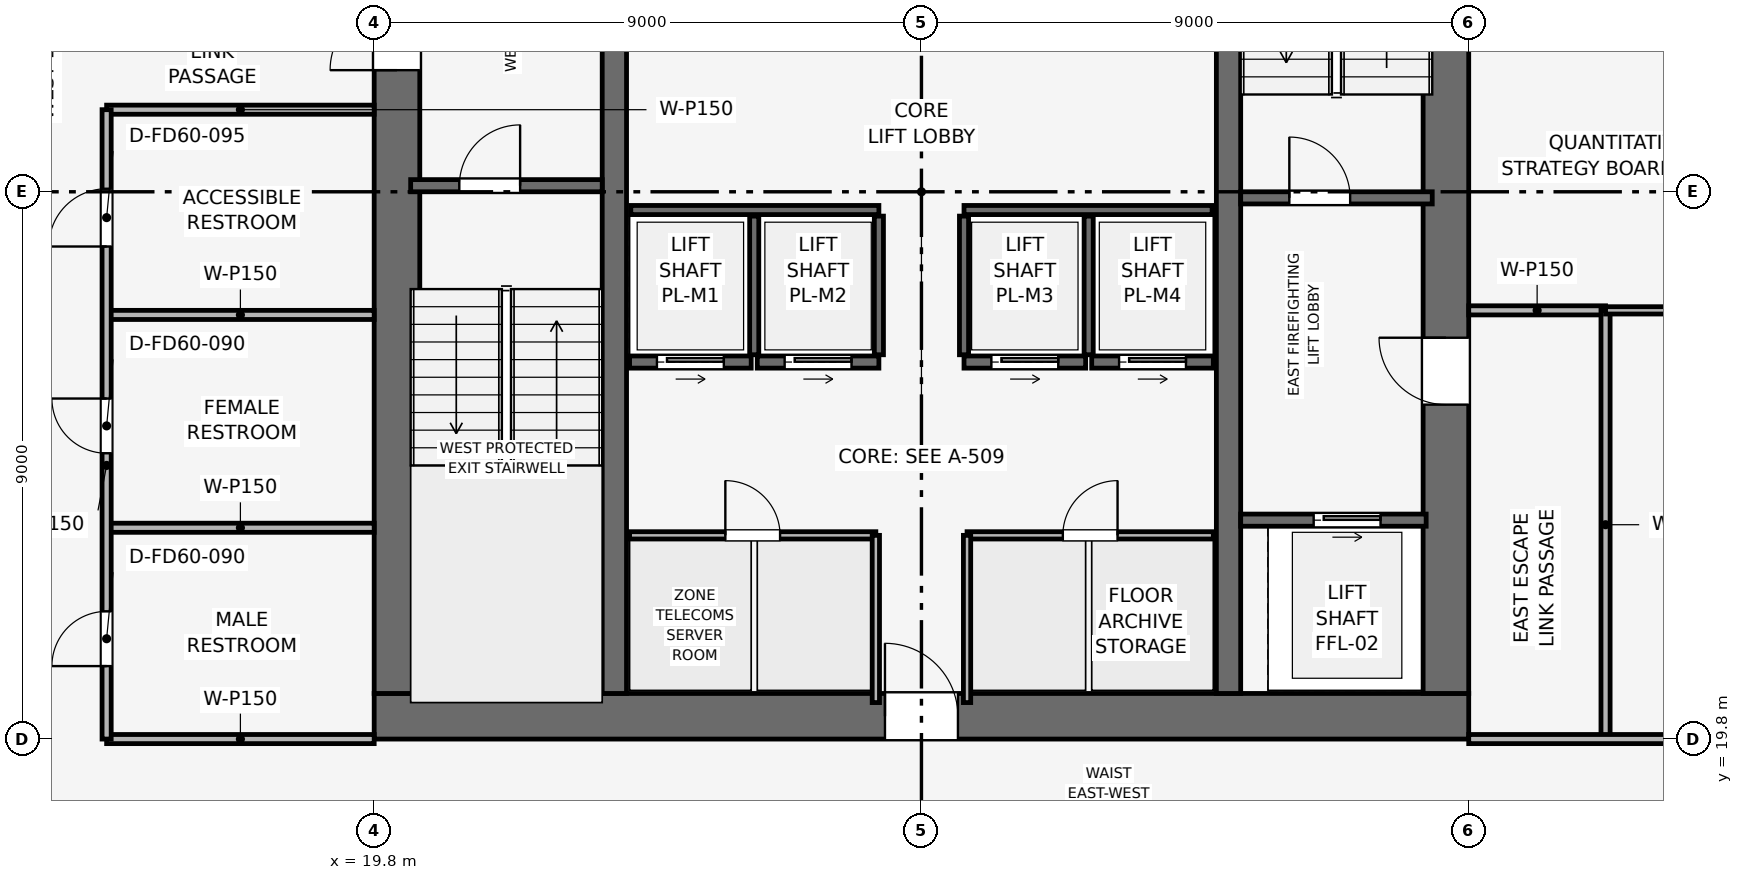
"""IFC4 building model, lengths in metres.
Left out: names, types, materials, properties, quantities, classifications, styles, units other than length and angle.
Written with IfcOpenShell. Run it as: python <this file> out.ifc"""

import sys

from ifc_helpers import new_model, si_unit, direction, frame, frame_2d, origin, place, context, subcontext, project, spatial, rectangle, extrude, element, fill, save


model = new_model("IFC4")
c1 = context("Model", 3, precision=1e-05, world=origin(), true_north=direction((0.0, 1.0)))
c2 = subcontext(c1, "Body", "Model", "MODEL_VIEW")
j1 = project(units=[si_unit("LENGTHUNIT", "METRE"), si_unit("PLANEANGLEUNIT", "RADIAN")], contexts=[c1])
p1 = place(None, origin())
s1 = spatial("IfcSite", under=j1, at=p1, CompositionType="ELEMENT")
p2 = place(p1, origin())
s2 = spatial("IfcBuilding", under=s1, at=p2, CompositionType="ELEMENT")
p3 = place(p2, frame((0.0, 0.0, 226.2)))
s3 = spatial("IfcBuildingStorey", under=s2, at=p3, CompositionType="ELEMENT", Elevation=226.2)
p4 = place(p3, frame((19.8, 20.175, 0.0), z_axis=(0.0, 0.0, 1.0), x_axis=(1.0, 0.0, 0.0)))
e1 = element("IfcWall", 1, at=p4, inside=s3, PredefinedType="SHEAR", context=c2, shape_type="SweptSolid", body=[
    extrude(rectangle(XDim=18.0, YDim=0.75, at=frame_2d((9.0, 0.0))), origin(), (0.0, 0.0, 1.0), 3.75),
])
p5 = place(p4, frame((8.4, 0.0, 0.0)))
e2 = element("IfcOpeningElement", 2, at=p5, cuts=e1, PredefinedType="OPENING", context=c2, shape_type="SweptSolid", body=[
    extrude(rectangle(XDim=1.2, YDim=2.2, at=frame_2d((0.6, 1.1))), frame((0.0, 0.385, 0.0), z_axis=(0.0, -1.0, 0.0), x_axis=(1.0, 0.0, 0.0)), (0.0, 0.0, 1.0), 0.77),
])
p6 = place(p3, frame((20.175, 20.55, 0.0), z_axis=(0.0, 0.0, 1.0), x_axis=(0.0, 1.0, 0.0)))
e3 = element("IfcWall", 3, at=p6, inside=s3, PredefinedType="SHEAR", context=c2, shape_type="SweptSolid", body=[
    extrude(rectangle(XDim=16.5, YDim=0.75, at=frame_2d((8.25, 0.0))), origin(), (0.0, 0.0, 1.0), 3.75),
])
p7 = place(p6, frame((10.25, 0.0, 0.0)))
e4 = element("IfcOpeningElement", 4, at=p7, cuts=e3, PredefinedType="OPENING", context=c2, shape_type="SweptSolid", body=[
    extrude(rectangle(XDim=1.1, YDim=2.15, at=frame_2d((0.55, 1.075))), frame((0.0, 0.385, 0.0), z_axis=(0.0, -1.0, 0.0), x_axis=(1.0, 0.0, 0.0)), (0.0, 0.0, 1.0), 0.77),
])
p8 = place(p3, frame((37.425, 20.55, 0.0), z_axis=(0.0, 0.0, 1.0), x_axis=(0.0, 1.0, 0.0)))
e5 = element("IfcWall", 5, at=p8, inside=s3, PredefinedType="SHEAR", context=c2, shape_type="SweptSolid", body=[
    extrude(rectangle(XDim=16.5, YDim=0.75, at=frame_2d((8.25, 0.0))), origin(), (0.0, 0.0, 1.0), 3.75),
])
p9 = place(p8, frame((4.75, 0.0, 0.0)))
e6 = element("IfcOpeningElement", 6, at=p9, cuts=e5, PredefinedType="OPENING", context=c2, shape_type="SweptSolid", body=[
    extrude(rectangle(XDim=1.1, YDim=2.15, at=frame_2d((0.55, 1.075))), frame((0.0, 0.385, 0.0), z_axis=(0.0, -1.0, 0.0), x_axis=(1.0, 0.0, 0.0)), (0.0, 0.0, 1.0), 0.77),
])
for number, where, z_axis, x_axis in (
    (7, (23.75, 20.55, 0.0), (0.0, 0.0, 1.0), (0.0, 1.0, 0.0)),
    (8, (33.85, 20.55, 0.0), (0.0, 0.0, 1.0), (0.0, 1.0, 0.0)),
):
    element("IfcWall", number, at=place(p3, frame(where, z_axis=z_axis, x_axis=x_axis)), inside=s3, PredefinedType="SHEAR", context=c2, shape_type="SweptSolid", body=[
        extrude(rectangle(XDim=16.5, YDim=0.4, at=frame_2d((8.25, 0.0))), origin(), (0.0, 0.0, 1.0), 3.75),
    ])
p10 = place(p3, frame((20.4, 28.9, 0.0), z_axis=(0.0, 0.0, 1.0), x_axis=(1.0, 0.0, 0.0)))
e9 = element("IfcWall", 9, at=p10, inside=s3, PredefinedType="SHEAR", context=c2, shape_type="SweptSolid", body=[
    extrude(rectangle(XDim=3.15, YDim=0.2, at=frame_2d((1.575, 0.0))), origin(), (0.0, 0.0, 1.0), 3.5),
])
p11 = place(p10, frame((0.8, 0.0, 0.0)))
e10 = element("IfcOpeningElement", 10, at=p11, cuts=e9, PredefinedType="OPENING", context=c2, shape_type="SweptSolid", body=[
    extrude(rectangle(XDim=1.0, YDim=2.1, at=frame_2d((0.5, 1.05))), frame((0.0, 0.11, 0.0), z_axis=(0.0, -1.0, 0.0), x_axis=(1.0, 0.0, 0.0)), (0.0, 0.0, 1.0), 0.22),
])
p12 = place(p3, frame((34.05, 28.7, 0.0), z_axis=(0.0, 0.0, 1.0), x_axis=(1.0, 0.0, 0.0)))
e11 = element("IfcWall", 11, at=p12, inside=s3, PredefinedType="SHEAR", context=c2, shape_type="SweptSolid", body=[
    extrude(rectangle(XDim=3.15, YDim=0.2, at=frame_2d((1.575, 0.0))), origin(), (0.0, 0.0, 1.0), 3.5),
])
p13 = place(p12, frame((0.8, 0.0, 0.0)))
e12 = element("IfcOpeningElement", 12, at=p13, cuts=e11, PredefinedType="OPENING", context=c2, shape_type="SweptSolid", body=[
    extrude(rectangle(XDim=1.0, YDim=2.1, at=frame_2d((0.5, 1.05))), frame((0.0, 0.11, 0.0), z_axis=(0.0, -1.0, 0.0), x_axis=(1.0, 0.0, 0.0)), (0.0, 0.0, 1.0), 0.22),
])
p14 = place(p3, frame((34.05, 23.4, 0.0), z_axis=(0.0, 0.0, 1.0), x_axis=(1.0, 0.0, 0.0)))
e13 = element("IfcWall", 13, at=p14, inside=s3, PredefinedType="SHEAR", context=c2, shape_type="SweptSolid", body=[
    extrude(rectangle(XDim=3.05, YDim=0.2, at=frame_2d((1.525, 0.0))), origin(), (0.0, 0.0, 1.0), 3.5),
])
p15 = place(p14, frame((1.2, 0.0, 0.0)))
e14 = element("IfcOpeningElement", 14, at=p15, cuts=e13, PredefinedType="OPENING", context=c2, shape_type="SweptSolid", body=[
    extrude(rectangle(XDim=1.1, YDim=2.15, at=frame_2d((0.55, 1.075))), frame((0.0, 0.11, 0.0), z_axis=(0.0, -1.0, 0.0), x_axis=(1.0, 0.0, 0.0)), (0.0, 0.0, 1.0), 0.22),
])
p16 = place(p3, frame((24.0, 26.0, 0.0), z_axis=(0.0, 0.0, 1.0), x_axis=(1.0, 0.0, 0.0)))
e15 = element("IfcWall", 15, at=p16, inside=s3, PredefinedType="SHEAR", context=c2, shape_type="SweptSolid", body=[
    extrude(rectangle(XDim=2.0, YDim=0.2, at=frame_2d((1.0, 0.0))), origin(), (0.0, 0.0, 1.0), 3.5),
])
p17 = place(p16, frame((0.45, 0.0, 0.0)))
e16 = element("IfcOpeningElement", 16, at=p17, cuts=e15, PredefinedType="OPENING", context=c2, shape_type="SweptSolid", body=[
    extrude(rectangle(XDim=1.1, YDim=2.15, at=frame_2d((0.55, 1.075))), frame((0.0, 0.11, 0.0), z_axis=(0.0, -1.0, 0.0), x_axis=(1.0, 0.0, 0.0)), (0.0, 0.0, 1.0), 0.22),
])
p18 = place(p3, frame((26.1, 26.0, 0.0), z_axis=(0.0, 0.0, 1.0), x_axis=(1.0, 0.0, 0.0)))
e17 = element("IfcWall", 17, at=p18, inside=s3, PredefinedType="SHEAR", context=c2, shape_type="SweptSolid", body=[
    extrude(rectangle(XDim=2.0, YDim=0.2, at=frame_2d((1.0, 0.0))), origin(), (0.0, 0.0, 1.0), 3.5),
])
p19 = place(p18, frame((0.45, 0.0, 0.0)))
e18 = element("IfcOpeningElement", 18, at=p19, cuts=e17, PredefinedType="OPENING", context=c2, shape_type="SweptSolid", body=[
    extrude(rectangle(XDim=1.1, YDim=2.15, at=frame_2d((0.55, 1.075))), frame((0.0, 0.11, 0.0), z_axis=(0.0, -1.0, 0.0), x_axis=(1.0, 0.0, 0.0)), (0.0, 0.0, 1.0), 0.22),
])
p20 = place(p3, frame((29.5, 26.0, 0.0), z_axis=(0.0, 0.0, 1.0), x_axis=(1.0, 0.0, 0.0)))
e19 = element("IfcWall", 19, at=p20, inside=s3, PredefinedType="SHEAR", context=c2, shape_type="SweptSolid", body=[
    extrude(rectangle(XDim=2.0, YDim=0.2, at=frame_2d((1.0, 0.0))), origin(), (0.0, 0.0, 1.0), 3.5),
])
p21 = place(p20, frame((0.45, 0.0, 0.0)))
e20 = element("IfcOpeningElement", 20, at=p21, cuts=e19, PredefinedType="OPENING", context=c2, shape_type="SweptSolid", body=[
    extrude(rectangle(XDim=1.1, YDim=2.15, at=frame_2d((0.55, 1.075))), frame((0.0, 0.11, 0.0), z_axis=(0.0, -1.0, 0.0), x_axis=(1.0, 0.0, 0.0)), (0.0, 0.0, 1.0), 0.22),
])
p22 = place(p3, frame((31.6, 26.0, 0.0), z_axis=(0.0, 0.0, 1.0), x_axis=(1.0, 0.0, 0.0)))
e21 = element("IfcWall", 21, at=p22, inside=s3, PredefinedType="SHEAR", context=c2, shape_type="SweptSolid", body=[
    extrude(rectangle(XDim=2.0, YDim=0.2, at=frame_2d((1.0, 0.0))), origin(), (0.0, 0.0, 1.0), 3.5),
])
p23 = place(p22, frame((0.45, 0.0, 0.0)))
e22 = element("IfcOpeningElement", 22, at=p23, cuts=e21, PredefinedType="OPENING", context=c2, shape_type="SweptSolid", body=[
    extrude(rectangle(XDim=1.1, YDim=2.15, at=frame_2d((0.55, 1.075))), frame((0.0, 0.11, 0.0), z_axis=(0.0, -1.0, 0.0), x_axis=(1.0, 0.0, 0.0)), (0.0, 0.0, 1.0), 0.22),
])
for number, where, z_axis, x_axis in (
    (23, (24.02, 28.5, 0.0), (0.0, 0.0, 1.0), (1.0, 0.0, 0.0)),
    (24, (29.5, 28.5, 0.0), (0.0, 0.0, 1.0), (1.0, 0.0, 0.0)),
):
    element("IfcWall", number, at=place(p3, frame(where, z_axis=z_axis, x_axis=x_axis)), inside=s3, PredefinedType="SHEAR", context=c2, shape_type="SweptSolid", body=[
        extrude(rectangle(XDim=4.08, YDim=0.15, at=frame_2d((2.04, 0.0))), origin(), (0.0, 0.0, 1.0), 3.5),
    ])
for number, where, z_axis, x_axis in (
    (25, (26.05, 26.12, 0.0), (0.0, 0.0, 1.0), (0.0, 1.0, 0.0)),
    (26, (28.1, 26.12, 0.0), (0.0, 0.0, 1.0), (0.0, 1.0, 0.0)),
    (27, (29.5, 26.12, 0.0), (0.0, 0.0, 1.0), (0.0, 1.0, 0.0)),
    (28, (31.55, 26.12, 0.0), (0.0, 0.0, 1.0), (0.0, 1.0, 0.0)),
):
    element("IfcWall", number, at=place(p3, frame(where, z_axis=z_axis, x_axis=x_axis)), inside=s3, PredefinedType="SHEAR", context=c2, shape_type="SweptSolid", body=[
        extrude(rectangle(XDim=2.28, YDim=0.15, at=frame_2d((1.14, 0.0))), origin(), (0.0, 0.0, 1.0), 3.5),
    ])
p24 = place(p3, frame((24.0, 23.15, 0.0), z_axis=(0.0, 0.0, 1.0), x_axis=(1.0, 0.0, 0.0)))
e29 = element("IfcWall", 29, at=p24, inside=s3, PredefinedType="PARTITIONING", context=c2, shape_type="SweptSolid", body=[
    extrude(rectangle(XDim=4.05, YDim=0.12, at=frame_2d((2.025, 0.0))), origin(), (0.0, 0.0, 1.0), 3.5),
])
p25 = place(p24, frame((1.575, 0.0, 0.0)))
e30 = element("IfcOpeningElement", 30, at=p25, cuts=e29, PredefinedType="OPENING", context=c2, shape_type="SweptSolid", body=[
    extrude(rectangle(XDim=0.9, YDim=2.1, at=frame_2d((0.45, 1.05))), frame((0.0, 0.07, 0.0), z_axis=(0.0, -1.0, 0.0), x_axis=(1.0, 0.0, 0.0)), (0.0, 0.0, 1.0), 0.14),
])
p26 = place(p3, frame((28.05, 20.4, 0.0), z_axis=(0.0, 0.0, 1.0), x_axis=(0.0, 1.0, 0.0)))
e31 = element("IfcWall", 31, at=p26, inside=s3, PredefinedType="PARTITIONING", context=c2, shape_type="SweptSolid", body=[
    extrude(rectangle(XDim=2.75, YDim=0.12, at=frame_2d((1.375, 0.0))), origin(), (0.0, 0.0, 1.0), 3.5),
])
p27 = place(p3, frame((29.55, 23.15, 0.0), z_axis=(0.0, 0.0, 1.0), x_axis=(1.0, 0.0, 0.0)))
e32 = element("IfcWall", 32, at=p27, inside=s3, PredefinedType="PARTITIONING", context=c2, shape_type="SweptSolid", body=[
    extrude(rectangle(XDim=4.05, YDim=0.12, at=frame_2d((2.025, 0.0))), origin(), (0.0, 0.0, 1.0), 3.5),
])
p28 = place(p27, frame((1.575, 0.0, 0.0)))
e33 = element("IfcOpeningElement", 33, at=p28, cuts=e32, PredefinedType="OPENING", context=c2, shape_type="SweptSolid", body=[
    extrude(rectangle(XDim=0.9, YDim=2.1, at=frame_2d((0.45, 1.05))), frame((0.0, 0.07, 0.0), z_axis=(0.0, -1.0, 0.0), x_axis=(1.0, 0.0, 0.0)), (0.0, 0.0, 1.0), 0.14),
])
p29 = place(p3, frame((29.55, 20.4, 0.0), z_axis=(0.0, 0.0, 1.0), x_axis=(0.0, 1.0, 0.0)))
e34 = element("IfcWall", 34, at=p29, inside=s3, PredefinedType="PARTITIONING", context=c2, shape_type="SweptSolid", body=[
    extrude(rectangle(XDim=2.75, YDim=0.12, at=frame_2d((1.375, 0.0))), origin(), (0.0, 0.0, 1.0), 3.5),
])
p30 = place(p3, frame((15.4, 19.8, 0.0), z_axis=(0.0, 0.0, 1.0), x_axis=(1.0, 0.0, 0.0)))
e35 = element("IfcWall", 35, at=p30, inside=s3, PredefinedType="PARTITIONING", context=c2, shape_type="SweptSolid", body=[
    extrude(rectangle(XDim=4.4, YDim=0.15, at=frame_2d((2.2, 0.0))), origin(), (0.0, 0.0, 1.0), 3.035),
])
for number, where, z_axis, x_axis in (
    (36, (15.4, 23.275, 0.0), (0.0, 0.0, 1.0), (1.0, 0.0, 0.0)),
    (37, (15.4, 26.775, 0.0), (0.0, 0.0, 1.0), (1.0, 0.0, 0.0)),
    (38, (15.4, 30.15, 0.0), (0.0, 0.0, 1.0), (1.0, 0.0, 0.0)),
):
    element("IfcWall", number, at=place(p3, frame(where, z_axis=z_axis, x_axis=x_axis)), inside=s3, PredefinedType="PARTITIONING", context=c2, shape_type="SweptSolid", body=[
        extrude(rectangle(XDim=4.4, YDim=0.15, at=frame_2d((2.2, 0.0))), origin(), (0.0, 0.0, 1.0), 3.5),
    ])
p31 = place(p3, frame((15.4, 19.8, 0.0), z_axis=(0.0, 0.0, 1.0), x_axis=(0.0, 1.0, 0.0)))
e39 = element("IfcWall", 39, at=p31, inside=s3, PredefinedType="PARTITIONING", context=c2, shape_type="SweptSolid", body=[
    extrude(rectangle(XDim=10.35, YDim=0.15, at=frame_2d((5.175, 0.0))), origin(), (0.0, 0.0, 1.0), 3.035),
])
p32 = place(p31, frame((1.2, 0.0, 0.0)))
e40 = element("IfcOpeningElement", 40, at=p32, cuts=e39, PredefinedType="OPENING", context=c2, shape_type="SweptSolid", body=[
    extrude(rectangle(XDim=0.9, YDim=2.1, at=frame_2d((0.45, 1.05))), frame((0.0, 0.085, 0.0), z_axis=(0.0, -1.0, 0.0), x_axis=(1.0, 0.0, 0.0)), (0.0, 0.0, 1.0), 0.17),
])
p33 = place(p31, frame((4.7, 0.0, 0.0)))
e41 = element("IfcOpeningElement", 41, at=p33, cuts=e39, PredefinedType="OPENING", context=c2, shape_type="SweptSolid", body=[
    extrude(rectangle(XDim=0.9, YDim=2.1, at=frame_2d((0.45, 1.05))), frame((0.0, 0.085, 0.0), z_axis=(0.0, -1.0, 0.0), x_axis=(1.0, 0.0, 0.0)), (0.0, 0.0, 1.0), 0.17),
])
p34 = place(p31, frame((8.1, 0.0, 0.0)))
e42 = element("IfcOpeningElement", 42, at=p34, cuts=e39, PredefinedType="OPENING", context=c2, shape_type="SweptSolid", body=[
    extrude(rectangle(XDim=0.95, YDim=2.1, at=frame_2d((0.475, 1.05))), frame((0.0, 0.085, 0.0), z_axis=(0.0, -1.0, 0.0), x_axis=(1.0, 0.0, 0.0)), (0.0, 0.0, 1.0), 0.17),
])
p35 = place(p3, frame((37.8, 26.85, 0.0), z_axis=(0.0, 0.0, 1.0), x_axis=(1.0, 0.0, 0.0)))
e43 = element("IfcWall", 43, at=p35, inside=s3, PredefinedType="PARTITIONING", context=c2, shape_type="SweptSolid", body=[
    extrude(rectangle(XDim=2.25, YDim=0.15, at=frame_2d((1.125, 0.0))), origin(), (0.0, 0.0, 1.0), 3.5),
])
p36 = place(p3, frame((40.05, 19.8, 0.0), z_axis=(0.0, 0.0, 1.0), x_axis=(0.0, 1.0, 0.0)))
e44 = element("IfcWall", 44, at=p36, inside=s3, PredefinedType="PARTITIONING", context=c2, shape_type="SweptSolid", body=[
    extrude(rectangle(XDim=7.05, YDim=0.15, at=frame_2d((3.525, 0.0))), origin(), (0.0, 0.0, 1.0), 3.035),
])
p37 = place(p3, frame((40.05, 26.85, 0.0), z_axis=(0.0, 0.0, 1.0), x_axis=(1.0, 0.0, 0.0)))
e45 = element("IfcWall", 45, at=p37, inside=s3, PredefinedType="PARTITIONING", context=c2, shape_type="SweptSolid", body=[
    extrude(rectangle(XDim=15.62, YDim=0.12, at=frame_2d((7.81, 0.0))), origin(), (0.0, 0.0, 1.0), 2.885),
])
p38 = place(p3, frame((37.8, 19.8, 0.0), z_axis=(0.0, 0.0, 1.0), x_axis=(1.0, 0.0, 0.0)))
e46 = element("IfcWall", 46, at=p38, inside=s3, PredefinedType="PARTITIONING", context=c2, shape_type="SweptSolid", body=[
    extrude(rectangle(XDim=17.87, YDim=0.15, at=frame_2d((8.935, 0.0))), origin(), (0.0, 0.0, 1.0), 2.885),
])
p39 = place(p38, frame((4.4, 0.0, 0.0)))
e47 = element("IfcOpeningElement", 47, at=p39, cuts=e46, PredefinedType="OPENING", context=c2, shape_type="SweptSolid", body=[
    extrude(rectangle(XDim=0.9, YDim=2.1, at=frame_2d((0.45, 1.05))), frame((0.0, 0.085, 0.0), z_axis=(0.0, -1.0, 0.0), x_axis=(1.0, 0.0, 0.0)), (0.0, 0.0, 1.0), 0.17),
])
p40 = place(p11, origin())
e48 = element("IfcDoor", 48, at=p40, inside=s3, OperationType="SINGLE_SWING_RIGHT", PredefinedType="DOOR", context=c2, shape_type="SweptSolid", body=[
    extrude(rectangle(XDim=1.0, YDim=2.1, at=frame_2d((0.5, 1.05))), frame((0.0, 0.025, 0.0), z_axis=(0.0, -1.0, 0.0), x_axis=(1.0, 0.0, 0.0)), (0.0, 0.0, 1.0), 0.05),
])
fill(e10, e48)
p41 = place(p13, origin())
e49 = element("IfcDoor", 49, at=p41, inside=s3, OperationType="SINGLE_SWING_LEFT", PredefinedType="DOOR", context=c2, shape_type="SweptSolid", body=[
    extrude(rectangle(XDim=1.0, YDim=2.1, at=frame_2d((0.5, 1.05))), frame((0.0, 0.025, 0.0), z_axis=(0.0, -1.0, 0.0), x_axis=(1.0, 0.0, 0.0)), (0.0, 0.0, 1.0), 0.05),
])
fill(e12, e49)
p42 = place(p15, origin())
e50 = element("IfcDoor", 50, at=p42, inside=s3, OperationType="SLIDING_TO_RIGHT", PredefinedType="DOOR", context=c2, shape_type="SweptSolid", body=[
    extrude(rectangle(XDim=1.1, YDim=2.15, at=frame_2d((0.55, 1.075))), frame((0.0, 0.025, 0.0), z_axis=(0.0, -1.0, 0.0), x_axis=(1.0, 0.0, 0.0)), (0.0, 0.0, 1.0), 0.05),
])
fill(e14, e50)
p43 = place(p17, origin())
e51 = element("IfcDoor", 51, at=p43, inside=s3, OperationType="SLIDING_TO_RIGHT", PredefinedType="DOOR", context=c2, shape_type="SweptSolid", body=[
    extrude(rectangle(XDim=1.1, YDim=2.15, at=frame_2d((0.55, 1.075))), frame((0.0, 0.025, 0.0), z_axis=(0.0, -1.0, 0.0), x_axis=(1.0, 0.0, 0.0)), (0.0, 0.0, 1.0), 0.05),
])
fill(e16, e51)
p44 = place(p19, origin())
e52 = element("IfcDoor", 52, at=p44, inside=s3, OperationType="SLIDING_TO_RIGHT", PredefinedType="DOOR", context=c2, shape_type="SweptSolid", body=[
    extrude(rectangle(XDim=1.1, YDim=2.15, at=frame_2d((0.55, 1.075))), frame((0.0, 0.025, 0.0), z_axis=(0.0, -1.0, 0.0), x_axis=(1.0, 0.0, 0.0)), (0.0, 0.0, 1.0), 0.05),
])
fill(e18, e52)
p45 = place(p21, origin())
e53 = element("IfcDoor", 53, at=p45, inside=s3, OperationType="SLIDING_TO_RIGHT", PredefinedType="DOOR", context=c2, shape_type="SweptSolid", body=[
    extrude(rectangle(XDim=1.1, YDim=2.15, at=frame_2d((0.55, 1.075))), frame((0.0, 0.025, 0.0), z_axis=(0.0, -1.0, 0.0), x_axis=(1.0, 0.0, 0.0)), (0.0, 0.0, 1.0), 0.05),
])
fill(e20, e53)
p46 = place(p23, origin())
e54 = element("IfcDoor", 54, at=p46, inside=s3, OperationType="SLIDING_TO_RIGHT", PredefinedType="DOOR", context=c2, shape_type="SweptSolid", body=[
    extrude(rectangle(XDim=1.1, YDim=2.15, at=frame_2d((0.55, 1.075))), frame((0.0, 0.025, 0.0), z_axis=(0.0, -1.0, 0.0), x_axis=(1.0, 0.0, 0.0)), (0.0, 0.0, 1.0), 0.05),
])
fill(e22, e54)
p47 = place(p25, origin())
e55 = element("IfcDoor", 55, at=p47, inside=s3, OperationType="SINGLE_SWING_LEFT", PredefinedType="DOOR", context=c2, shape_type="SweptSolid", body=[
    extrude(rectangle(XDim=0.9, YDim=2.1, at=frame_2d((0.45, 1.05))), frame((0.0, 0.025, 0.0), z_axis=(0.0, -1.0, 0.0), x_axis=(1.0, 0.0, 0.0)), (0.0, 0.0, 1.0), 0.05),
])
fill(e30, e55)
p48 = place(p28, origin())
e56 = element("IfcDoor", 56, at=p48, inside=s3, OperationType="SINGLE_SWING_RIGHT", PredefinedType="DOOR", context=c2, shape_type="SweptSolid", body=[
    extrude(rectangle(XDim=0.9, YDim=2.1, at=frame_2d((0.45, 1.05))), frame((0.0, 0.025, 0.0), z_axis=(0.0, -1.0, 0.0), x_axis=(1.0, 0.0, 0.0)), (0.0, 0.0, 1.0), 0.05),
])
fill(e33, e56)
p49 = place(p32, origin())
e57 = element("IfcDoor", 57, at=p49, inside=s3, OperationType="SINGLE_SWING_LEFT", PredefinedType="DOOR", context=c2, shape_type="SweptSolid", body=[
    extrude(rectangle(XDim=0.9, YDim=2.1, at=frame_2d((0.45, 1.05))), frame((0.0, 0.025, 0.0), z_axis=(0.0, -1.0, 0.0), x_axis=(1.0, 0.0, 0.0)), (0.0, 0.0, 1.0), 0.05),
])
fill(e40, e57)
p50 = place(p33, origin())
e58 = element("IfcDoor", 58, at=p50, inside=s3, OperationType="SINGLE_SWING_RIGHT", PredefinedType="DOOR", context=c2, shape_type="SweptSolid", body=[
    extrude(rectangle(XDim=0.9, YDim=2.1, at=frame_2d((0.45, 1.05))), frame((0.0, 0.025, 0.0), z_axis=(0.0, -1.0, 0.0), x_axis=(1.0, 0.0, 0.0)), (0.0, 0.0, 1.0), 0.05),
])
fill(e41, e58)
p51 = place(p34, origin())
e59 = element("IfcDoor", 59, at=p51, inside=s3, OperationType="SINGLE_SWING_LEFT", PredefinedType="DOOR", context=c2, shape_type="SweptSolid", body=[
    extrude(rectangle(XDim=0.95, YDim=2.1, at=frame_2d((0.475, 1.05))), frame((0.0, 0.025, 0.0), z_axis=(0.0, -1.0, 0.0), x_axis=(1.0, 0.0, 0.0)), (0.0, 0.0, 1.0), 0.05),
])
fill(e42, e59)
p52 = place(p7, origin())
e60 = element("IfcDoor", 60, at=p52, inside=s3, OperationType="SINGLE_SWING_LEFT", PredefinedType="DOOR", context=c2, shape_type="SweptSolid", body=[
    extrude(rectangle(XDim=1.1, YDim=2.15, at=frame_2d((0.55, 1.075))), frame((0.0, 0.025, 0.0), z_axis=(0.0, -1.0, 0.0), x_axis=(1.0, 0.0, 0.0)), (0.0, 0.0, 1.0), 0.05),
])
fill(e4, e60)
p53 = place(p9, origin())
e61 = element("IfcDoor", 61, at=p53, inside=s3, OperationType="SINGLE_SWING_RIGHT", PredefinedType="DOOR", context=c2, shape_type="SweptSolid", body=[
    extrude(rectangle(XDim=1.1, YDim=2.15, at=frame_2d((0.55, 1.075))), frame((0.0, 0.025, 0.0), z_axis=(0.0, -1.0, 0.0), x_axis=(1.0, 0.0, 0.0)), (0.0, 0.0, 1.0), 0.05),
])
fill(e6, e61)
p54 = place(p5, origin())
e62 = element("IfcDoor", 62, at=p54, inside=s3, OperationType="SINGLE_SWING_LEFT", PredefinedType="DOOR", context=c2, shape_type="SweptSolid", body=[
    extrude(rectangle(XDim=1.2, YDim=2.2, at=frame_2d((0.6, 1.1))), frame((0.0, 0.025, 0.0), z_axis=(0.0, -1.0, 0.0), x_axis=(1.0, 0.0, 0.0)), (0.0, 0.0, 1.0), 0.05),
])
fill(e2, e62)
save(model, sys.argv[1])
